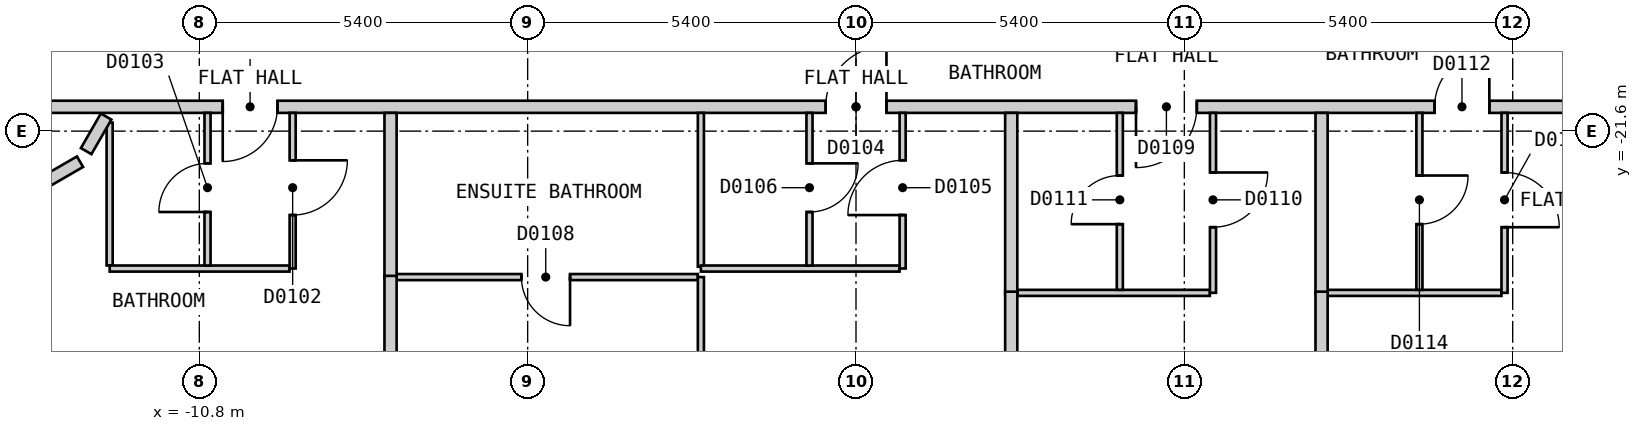
"""IFC4 building model, lengths in metres.
Left out: names, types, materials, properties, quantities, classifications, styles, units other than length and angle.
Written with IfcOpenShell. Run it as: python <this file> out.ifc"""

import sys

from ifc_helpers import new_model, si_unit, direction, frame, frame_2d, origin, place, context, subcontext, project, spatial, rectangle, extrude, element, fill, save


model = new_model("IFC4")
c1 = context("Model", 3, precision=1e-05, world=origin(), true_north=direction((0.0, 1.0)))
c2 = subcontext(c1, "Body", "Model", "MODEL_VIEW")
j1 = project(units=[si_unit("LENGTHUNIT", "METRE"), si_unit("PLANEANGLEUNIT", "RADIAN")], contexts=[c1])
p1 = place(None, origin())
s1 = spatial("IfcSite", under=j1, at=p1, CompositionType="ELEMENT")
p2 = place(p1, origin())
s2 = spatial("IfcBuilding", under=s1, at=p2, CompositionType="ELEMENT")
p3 = place(p2, frame((0.0, 0.0, 23.4)))
s3 = spatial("IfcBuildingStorey", under=s2, at=p3, CompositionType="ELEMENT", Elevation=23.4)
p4 = place(p3, frame((-15.4, -21.2, 0.0), z_axis=(0.0, 0.0, 1.0), x_axis=(1.0, 0.0, 0.0)))
e1 = element("IfcWall", 1, at=p4, inside=s3, PredefinedType="PARTITIONING", context=c2, shape_type="SweptSolid", body=[
    extrude(rectangle(XDim=30.799, YDim=0.2, at=frame_2d((15.399, 0.0))), origin(), (0.0, 0.0, 1.0), 2.7),
])
p5 = place(p4, frame((4.985, 0.0, 0.0)))
e2 = element("IfcOpeningElement", 2, at=p5, cuts=e1, PredefinedType="OPENING", context=c2, shape_type="SweptSolid", body=[
    extrude(rectangle(XDim=0.9, YDim=2.1, at=frame_2d((0.45, 1.05))), frame((0.0, 0.11, 0.0), z_axis=(0.0, -1.0, 0.0), x_axis=(1.0, 0.0, 0.0)), (0.0, 0.0, 1.0), 0.22),
])
p6 = place(p4, frame((14.901, 0.0, 0.0)))
e3 = element("IfcOpeningElement", 3, at=p6, cuts=e1, PredefinedType="OPENING", context=c2, shape_type="SweptSolid", body=[
    extrude(rectangle(XDim=1.0, YDim=2.1, at=frame_2d((0.5, 1.05))), frame((0.0, 0.11, 0.0), z_axis=(0.0, -1.0, 0.0), x_axis=(1.0, 0.0, 0.0)), (0.0, 0.0, 1.0), 0.22),
])
p7 = place(p4, frame((20.005, 0.0, 0.0)))
e4 = element("IfcOpeningElement", 4, at=p7, cuts=e1, PredefinedType="OPENING", context=c2, shape_type="SweptSolid", body=[
    extrude(rectangle(XDim=1.0, YDim=2.1, at=frame_2d((0.5, 1.05))), frame((0.0, 0.11, 0.0), z_axis=(0.0, -1.0, 0.0), x_axis=(1.0, 0.0, 0.0)), (0.0, 0.0, 1.0), 0.22),
])
p8 = place(p4, frame((24.916, 0.0, 0.0)))
e5 = element("IfcOpeningElement", 5, at=p8, cuts=e1, PredefinedType="OPENING", context=c2, shape_type="SweptSolid", body=[
    extrude(rectangle(XDim=0.9, YDim=2.1, at=frame_2d((0.45, 1.05))), frame((0.0, 0.11, 0.0), z_axis=(0.0, -1.0, 0.0), x_axis=(1.0, 0.0, 0.0)), (0.0, 0.0, 1.0), 0.22),
])
p9 = place(p3, frame((-12.275, -21.46, 0.0), z_axis=(0.0, 0.0, 1.0), x_axis=(0.0, -1.0, 0.0)))
e6 = element("IfcWall", 6, at=p9, inside=s3, PredefinedType="PARTITIONING", context=c2, shape_type="SweptSolid", body=[
    extrude(rectangle(XDim=2.349, YDim=0.1, at=frame_2d((1.175, 0.0))), origin(), (0.0, 0.0, 1.0), 2.7),
])
p10 = place(p3, frame((-2.551, -21.3, 0.0), z_axis=(0.0, 0.0, 1.0), x_axis=(0.0, -1.0, 0.0)))
e7 = element("IfcWall", 7, at=p10, inside=s3, PredefinedType="PARTITIONING", context=c2, shape_type="SweptSolid", body=[
    extrude(rectangle(XDim=2.53, YDim=0.1, at=frame_2d((1.265, 0.0))), origin(), (0.0, 0.0, 1.0), 2.7),
])
p11 = place(p3, frame((-12.274, -23.86, 0.0), z_axis=(0.0, 0.0, 1.0), x_axis=(1.0, 0.0, 0.0)))
e8 = element("IfcWall", 8, at=p11, inside=s3, PredefinedType="PARTITIONING", context=c2, shape_type="SweptSolid", body=[
    extrude(rectangle(XDim=2.958, YDim=0.1, at=frame_2d((1.479, 0.0))), origin(), (0.0, 0.0, 1.0), 2.7),
])
p12 = place(p3, frame((-2.551, -23.86, 0.0), z_axis=(0.0, 0.0, 1.0), x_axis=(1.0, 0.0, 0.0)))
e9 = element("IfcWall", 9, at=p12, inside=s3, PredefinedType="PARTITIONING", context=c2, shape_type="SweptSolid", body=[
    extrude(rectangle(XDim=3.267, YDim=0.1, at=frame_2d((1.634, 0.0))), origin(), (0.0, 0.0, 1.0), 2.7),
])
p13 = place(p3, frame((-7.555, -24.0, 0.0), z_axis=(0.0, 0.0, 1.0), x_axis=(1.0, 0.0, 0.0)))
e10 = element("IfcWall", 10, at=p13, inside=s3, PredefinedType="PARTITIONING", context=c2, shape_type="SweptSolid", body=[
    extrude(rectangle(XDim=4.954, YDim=0.1, at=frame_2d((2.477, 0.0))), origin(), (0.0, 0.0, 1.0), 2.7),
])
p14 = place(p13, frame((2.052, 0.0, 0.0)))
e11 = element("IfcOpeningElement", 11, at=p14, cuts=e10, PredefinedType="OPENING", context=c2, shape_type="SweptSolid", body=[
    extrude(rectangle(XDim=0.8, YDim=2.1, at=frame_2d((0.4, 1.05))), frame((0.0, 0.06, 0.0), z_axis=(0.0, -1.0, 0.0), x_axis=(1.0, 0.0, 0.0)), (0.0, 0.0, 1.0), 0.12),
])
p15 = place(p3, frame((2.653, -24.26, 0.0), z_axis=(0.0, 0.0, 1.0), x_axis=(1.0, 0.0, 0.0)))
e12 = element("IfcWall", 12, at=p15, inside=s3, PredefinedType="PARTITIONING", context=c2, shape_type="SweptSolid", body=[
    extrude(rectangle(XDim=3.167, YDim=0.1, at=frame_2d((1.583, 0.0))), origin(), (0.0, 0.0, 1.0), 2.7),
])
p16 = place(p3, frame((7.757, -24.26, 0.0), z_axis=(0.0, 0.0, 1.0), x_axis=(1.0, 0.0, 0.0)))
e13 = element("IfcWall", 13, at=p16, inside=s3, PredefinedType="PARTITIONING", context=c2, shape_type="SweptSolid", body=[
    extrude(rectangle(XDim=2.858, YDim=0.1, at=frame_2d((1.429, 0.0))), origin(), (0.0, 0.0, 1.0), 2.7),
])
p17 = place(p3, frame((4.339, -24.21, 0.0), z_axis=(0.0, 0.0, 1.0), x_axis=(0.0, 1.0, 0.0)))
e14 = element("IfcWall", 14, at=p17, inside=s3, PredefinedType="PARTITIONING", context=c2, shape_type="SweptSolid", body=[
    extrude(rectangle(XDim=2.91, YDim=0.1, at=frame_2d((1.455, 0.0))), origin(), (0.0, 0.0, 1.0), 2.7),
])
p18 = place(p17, frame((1.08, 0.0, 0.0)))
e15 = element("IfcOpeningElement", 15, at=p18, cuts=e14, PredefinedType="OPENING", context=c2, shape_type="SweptSolid", body=[
    extrude(rectangle(XDim=0.8, YDim=2.1, at=frame_2d((0.4, 1.05))), frame((0.0, 0.06, 0.0), z_axis=(0.0, -1.0, 0.0), x_axis=(1.0, 0.0, 0.0)), (0.0, 0.0, 1.0), 0.12),
])
p19 = place(p3, frame((5.871, -24.259, 0.0), z_axis=(0.0, 0.0, 1.0), x_axis=(0.0, 1.0, 0.0)))
e16 = element("IfcWall", 16, at=p19, inside=s3, PredefinedType="PARTITIONING", context=c2, shape_type="SweptSolid", body=[
    extrude(rectangle(XDim=2.959, YDim=0.1, at=frame_2d((1.479, 0.0))), origin(), (0.0, 0.0, 1.0), 2.7),
])
p20 = place(p19, frame((1.079, 0.0, 0.0)))
e17 = element("IfcOpeningElement", 17, at=p20, cuts=e16, PredefinedType="OPENING", context=c2, shape_type="SweptSolid", body=[
    extrude(rectangle(XDim=0.9, YDim=2.1, at=frame_2d((0.45, 1.05))), frame((0.0, 0.06, 0.0), z_axis=(0.0, -1.0, 0.0), x_axis=(1.0, 0.0, 0.0)), (0.0, 0.0, 1.0), 0.12),
])
p21 = place(p3, frame((0.767, -23.859, 0.0), z_axis=(0.0, 0.0, 1.0), x_axis=(0.0, 1.0, 0.0)))
e18 = element("IfcWall", 18, at=p21, inside=s3, PredefinedType="PARTITIONING", context=c2, shape_type="SweptSolid", body=[
    extrude(rectangle(XDim=2.559, YDim=0.1, at=frame_2d((1.279, 0.0))), origin(), (0.0, 0.0, 1.0), 2.7),
])
p22 = place(p21, frame((0.879, 0.0, 0.0)))
e19 = element("IfcOpeningElement", 19, at=p22, cuts=e18, PredefinedType="OPENING", context=c2, shape_type="SweptSolid", body=[
    extrude(rectangle(XDim=0.9, YDim=2.1, at=frame_2d((0.45, 1.05))), frame((0.0, 0.06, 0.0), z_axis=(0.0, -1.0, 0.0), x_axis=(1.0, 0.0, 0.0)), (0.0, 0.0, 1.0), 0.12),
])
p23 = place(p3, frame((9.266, -24.21, 0.0), z_axis=(0.0, 0.0, 1.0), x_axis=(0.0, 1.0, 0.0)))
e20 = element("IfcWall", 20, at=p23, inside=s3, PredefinedType="PARTITIONING", context=c2, shape_type="SweptSolid", body=[
    extrude(rectangle(XDim=2.91, YDim=0.1, at=frame_2d((1.455, 0.0))), origin(), (0.0, 0.0, 1.0), 2.7),
])
p24 = place(p23, frame((1.08, 0.0, 0.0)))
e21 = element("IfcOpeningElement", 21, at=p24, cuts=e20, PredefinedType="OPENING", context=c2, shape_type="SweptSolid", body=[
    extrude(rectangle(XDim=0.8, YDim=2.1, at=frame_2d((0.4, 1.05))), frame((0.0, 0.06, 0.0), z_axis=(0.0, -1.0, 0.0), x_axis=(1.0, 0.0, 0.0)), (0.0, 0.0, 1.0), 0.12),
])
p25 = place(p3, frame((10.666, -24.259, 0.0), z_axis=(0.0, 0.0, 1.0), x_axis=(0.0, 1.0, 0.0)))
e22 = element("IfcWall", 22, at=p25, inside=s3, PredefinedType="PARTITIONING", context=c2, shape_type="SweptSolid", body=[
    extrude(rectangle(XDim=2.959, YDim=0.1, at=frame_2d((1.479, 0.0))), origin(), (0.0, 0.0, 1.0), 2.7),
])
p26 = place(p25, frame((1.079, 0.0, 0.0)))
e23 = element("IfcOpeningElement", 23, at=p26, cuts=e22, PredefinedType="OPENING", context=c2, shape_type="SweptSolid", body=[
    extrude(rectangle(XDim=0.9, YDim=2.1, at=frame_2d((0.45, 1.05))), frame((0.0, 0.06, 0.0), z_axis=(0.0, -1.0, 0.0), x_axis=(1.0, 0.0, 0.0)), (0.0, 0.0, 1.0), 0.12),
])
p27 = place(p3, frame((-0.765, -23.81, 0.0), z_axis=(0.0, 0.0, 1.0), x_axis=(0.0, 1.0, 0.0)))
e24 = element("IfcWall", 24, at=p27, inside=s3, PredefinedType="PARTITIONING", context=c2, shape_type="SweptSolid", body=[
    extrude(rectangle(XDim=2.51, YDim=0.1, at=frame_2d((1.255, 0.0))), origin(), (0.0, 0.0, 1.0), 2.7),
])
p28 = place(p27, frame((0.88, 0.0, 0.0)))
e25 = element("IfcOpeningElement", 25, at=p28, cuts=e24, PredefinedType="OPENING", context=c2, shape_type="SweptSolid", body=[
    extrude(rectangle(XDim=0.8, YDim=2.1, at=frame_2d((0.4, 1.05))), frame((0.0, 0.06, 0.0), z_axis=(0.0, -1.0, 0.0), x_axis=(1.0, 0.0, 0.0)), (0.0, 0.0, 1.0), 0.12),
])
p29 = place(p3, frame((-9.265, -23.859, 0.0), z_axis=(0.0, 0.0, 1.0), x_axis=(0.0, 1.0, 0.0)))
e26 = element("IfcWall", 26, at=p29, inside=s3, PredefinedType="PARTITIONING", context=c2, shape_type="SweptSolid", body=[
    extrude(rectangle(XDim=2.559, YDim=0.1, at=frame_2d((1.279, 0.0))), origin(), (0.0, 0.0, 1.0), 2.7),
])
p30 = place(p29, frame((0.879, 0.0, 0.0)))
e27 = element("IfcOpeningElement", 27, at=p30, cuts=e26, PredefinedType="OPENING", context=c2, shape_type="SweptSolid", body=[
    extrude(rectangle(XDim=0.9, YDim=2.1, at=frame_2d((0.45, 1.05))), frame((0.0, 0.06, 0.0), z_axis=(0.0, -1.0, 0.0), x_axis=(1.0, 0.0, 0.0)), (0.0, 0.0, 1.0), 0.12),
])
p31 = place(p3, frame((-10.665, -23.81, 0.0), z_axis=(0.0, 0.0, 1.0), x_axis=(0.0, 1.0, 0.0)))
e28 = element("IfcWall", 28, at=p31, inside=s3, PredefinedType="PARTITIONING", context=c2, shape_type="SweptSolid", body=[
    extrude(rectangle(XDim=2.51, YDim=0.1, at=frame_2d((1.255, 0.0))), origin(), (0.0, 0.0, 1.0), 2.7),
])
p32 = place(p31, frame((0.88, 0.0, 0.0)))
e29 = element("IfcOpeningElement", 29, at=p32, cuts=e28, PredefinedType="OPENING", context=c2, shape_type="SweptSolid", body=[
    extrude(rectangle(XDim=0.8, YDim=2.1, at=frame_2d((0.4, 1.05))), frame((0.0, 0.06, 0.0), z_axis=(0.0, -1.0, 0.0), x_axis=(1.0, 0.0, 0.0)), (0.0, 0.0, 1.0), 0.12),
])
p33 = place(p3, frame((-2.551, -28.1, 0.0), z_axis=(0.0, 0.0, 1.0), x_axis=(0.0, 1.0, 0.0)))
e30 = element("IfcWall", 30, at=p33, inside=s3, PredefinedType="PARTITIONING", context=c2, shape_type="SweptSolid", body=[
    extrude(rectangle(XDim=4.1, YDim=0.1, at=frame_2d((2.05, 0.0))), origin(), (0.0, 0.0, 1.0), 2.7),
])
p34 = place(p33, frame((1.7, 0.0, 0.0)))
e31 = element("IfcOpeningElement", 31, at=p34, cuts=e30, PredefinedType="OPENING", context=c2, shape_type="SweptSolid", body=[
    extrude(rectangle(XDim=0.9, YDim=2.1, at=frame_2d((0.45, 1.05))), frame((0.0, 0.06, 0.0), z_axis=(0.0, -1.0, 0.0), x_axis=(1.0, 0.0, 0.0)), (0.0, 0.0, 1.0), 0.12),
])
p35 = place(p3, frame((-7.655, -21.3, 0.0), z_axis=(0.0, 0.0, 1.0), x_axis=(0.0, -1.0, 0.0)))
e32 = element("IfcWall", 32, at=p35, inside=s3, PredefinedType="PARTITIONING", context=c2, shape_type="SweptSolid", body=[
    extrude(rectangle(XDim=2.72, YDim=0.2, at=frame_2d((1.36, 0.0))), origin(), (0.0, 0.0, 1.0), 2.7),
])
for number, where, z_axis, x_axis in (
    (33, (7.657, -21.3, 0.0), (0.0, 0.0, 1.0), (0.0, -1.0, 0.0)),
    (34, (2.553, -21.3, 0.0), (0.0, 0.0, 1.0), (0.0, -1.0, 0.0)),
):
    element("IfcWall", number, at=place(p3, frame(where, z_axis=z_axis, x_axis=x_axis)), inside=s3, PredefinedType="PARTITIONING", context=c2, shape_type="SweptSolid", body=[
        extrude(rectangle(XDim=2.98, YDim=0.2, at=frame_2d((1.49, 0.0))), origin(), (0.0, 0.0, 1.0), 2.7),
    ])
p36 = place(p3, frame((-12.661, -21.929, 0.0), z_axis=(0.0, 0.0, 1.0), x_axis=(0.499379051742, 0.866383611734, 0.0)))
e35 = element("IfcWall", 35, at=p36, inside=s3, PredefinedType="PARTITIONING", context=c2, shape_type="SweptSolid", body=[
    extrude(rectangle(XDim=0.656, YDim=0.2, at=frame_2d((0.328, 0.0))), origin(), (0.0, 0.0, 1.0), 2.7),
])
for number, where, z_axis, x_axis in (
    (36, (7.657, -28.1, 0.0), (0.0, 0.0, 1.0), (0.0, 1.0, 0.0)),
    (37, (2.553, -28.1, 0.0), (0.0, 0.0, 1.0), (0.0, 1.0, 0.0)),
):
    element("IfcWall", number, at=place(p3, frame(where, z_axis=z_axis, x_axis=x_axis)), inside=s3, PredefinedType="PARTITIONING", context=c2, shape_type="SweptSolid", body=[
        extrude(rectangle(XDim=3.86, YDim=0.2, at=frame_2d((1.93, 0.0))), origin(), (0.0, 0.0, 1.0), 2.7),
    ])
p37 = place(p3, frame((-7.655, -28.1, 0.0), z_axis=(0.0, 0.0, 1.0), x_axis=(0.0, 1.0, 0.0)))
e38 = element("IfcWall", 38, at=p37, inside=s3, PredefinedType="PARTITIONING", context=c2, shape_type="SweptSolid", body=[
    extrude(rectangle(XDim=4.12, YDim=0.2, at=frame_2d((2.06, 0.0))), origin(), (0.0, 0.0, 1.0), 2.7),
])
p38 = place(p3, frame((-17.954, -25.101, 0.0), z_axis=(0.0, 0.0, 1.0), x_axis=(0.865999098103, 0.500045560009, 0.0)))
e39 = element("IfcWall", 39, at=p38, inside=s3, PredefinedType="PARTITIONING", context=c2, shape_type="SweptSolid", body=[
    extrude(rectangle(XDim=5.996, YDim=0.2, at=frame_2d((2.998, 0.0))), origin(), (0.0, 0.0, 1.0), 2.7),
])
p39 = place(p5, origin())
e40 = element("IfcDoor", 40, at=p39, inside=s3, OperationType="SINGLE_SWING_LEFT", PredefinedType="DOOR", context=c2, shape_type="SweptSolid", body=[
    extrude(rectangle(XDim=0.9, YDim=2.1, at=frame_2d((0.45, 1.05))), frame((0.0, 0.025, 0.0), z_axis=(0.0, -1.0, 0.0), x_axis=(1.0, 0.0, 0.0)), (0.0, 0.0, 1.0), 0.05),
])
fill(e2, e40)
p40 = place(p30, origin())
e41 = element("IfcDoor", 41, at=p40, inside=s3, OperationType="SINGLE_SWING_RIGHT", PredefinedType="DOOR", context=c2, shape_type="SweptSolid", body=[
    extrude(rectangle(XDim=0.9, YDim=2.1, at=frame_2d((0.45, 1.05))), frame((0.0, 0.025, 0.0), z_axis=(0.0, -1.0, 0.0), x_axis=(1.0, 0.0, 0.0)), (0.0, 0.0, 1.0), 0.05),
])
fill(e27, e41)
p41 = place(p32, origin())
e42 = element("IfcDoor", 42, at=p41, inside=s3, OperationType="SINGLE_SWING_LEFT", PredefinedType="DOOR", context=c2, shape_type="SweptSolid", body=[
    extrude(rectangle(XDim=0.8, YDim=2.1, at=frame_2d((0.4, 1.05))), frame((0.0, 0.025, 0.0), z_axis=(0.0, -1.0, 0.0), x_axis=(1.0, 0.0, 0.0)), (0.0, 0.0, 1.0), 0.05),
])
fill(e29, e42)
p42 = place(p6, origin())
e43 = element("IfcDoor", 43, at=p42, inside=s3, OperationType="SINGLE_SWING_RIGHT", PredefinedType="DOOR", context=c2, shape_type="SweptSolid", body=[
    extrude(rectangle(XDim=1.0, YDim=2.1, at=frame_2d((0.5, 1.05))), frame((0.0, 0.025, 0.0), z_axis=(0.0, -1.0, 0.0), x_axis=(1.0, 0.0, 0.0)), (0.0, 0.0, 1.0), 0.05),
])
fill(e3, e43)
p43 = place(p22, origin())
e44 = element("IfcDoor", 44, at=p43, inside=s3, OperationType="SINGLE_SWING_LEFT", PredefinedType="DOOR", context=c2, shape_type="SweptSolid", body=[
    extrude(rectangle(XDim=0.9, YDim=2.1, at=frame_2d((0.45, 1.05))), frame((0.0, 0.025, 0.0), z_axis=(0.0, -1.0, 0.0), x_axis=(1.0, 0.0, 0.0)), (0.0, 0.0, 1.0), 0.05),
])
fill(e19, e44)
p44 = place(p28, origin())
e45 = element("IfcDoor", 45, at=p44, inside=s3, OperationType="SINGLE_SWING_RIGHT", PredefinedType="DOOR", context=c2, shape_type="SweptSolid", body=[
    extrude(rectangle(XDim=0.8, YDim=2.1, at=frame_2d((0.4, 1.05))), frame((0.0, 0.025, 0.0), z_axis=(0.0, -1.0, 0.0), x_axis=(1.0, 0.0, 0.0)), (0.0, 0.0, 1.0), 0.05),
])
fill(e25, e45)
p45 = place(p14, origin())
e46 = element("IfcDoor", 46, at=p45, inside=s3, OperationType="SINGLE_SWING_RIGHT", PredefinedType="DOOR", context=c2, shape_type="SweptSolid", body=[
    extrude(rectangle(XDim=0.8, YDim=2.1, at=frame_2d((0.4, 1.05))), frame((0.0, 0.025, 0.0), z_axis=(0.0, -1.0, 0.0), x_axis=(1.0, 0.0, 0.0)), (0.0, 0.0, 1.0), 0.05),
])
fill(e11, e46)
p46 = place(p7, origin())
e47 = element("IfcDoor", 47, at=p46, inside=s3, OperationType="SINGLE_SWING_LEFT", PredefinedType="DOOR", context=c2, shape_type="SweptSolid", body=[
    extrude(rectangle(XDim=1.0, YDim=2.1, at=frame_2d((0.5, 1.05))), frame((0.0, 0.025, 0.0), z_axis=(0.0, -1.0, 0.0), x_axis=(1.0, 0.0, 0.0)), (0.0, 0.0, 1.0), 0.05),
])
fill(e4, e47)
p47 = place(p20, origin())
e48 = element("IfcDoor", 48, at=p47, inside=s3, OperationType="SINGLE_SWING_RIGHT", PredefinedType="DOOR", context=c2, shape_type="SweptSolid", body=[
    extrude(rectangle(XDim=0.9, YDim=2.1, at=frame_2d((0.45, 1.05))), frame((0.0, 0.025, 0.0), z_axis=(0.0, -1.0, 0.0), x_axis=(1.0, 0.0, 0.0)), (0.0, 0.0, 1.0), 0.05),
])
fill(e17, e48)
p48 = place(p18, origin())
e49 = element("IfcDoor", 49, at=p48, inside=s3, OperationType="SINGLE_SWING_LEFT", PredefinedType="DOOR", context=c2, shape_type="SweptSolid", body=[
    extrude(rectangle(XDim=0.8, YDim=2.1, at=frame_2d((0.4, 1.05))), frame((0.0, 0.025, 0.0), z_axis=(0.0, -1.0, 0.0), x_axis=(1.0, 0.0, 0.0)), (0.0, 0.0, 1.0), 0.05),
])
fill(e15, e49)
p49 = place(p8, origin())
e50 = element("IfcDoor", 50, at=p49, inside=s3, OperationType="SINGLE_SWING_RIGHT", PredefinedType="DOOR", context=c2, shape_type="SweptSolid", body=[
    extrude(rectangle(XDim=0.9, YDim=2.1, at=frame_2d((0.45, 1.05))), frame((0.0, 0.025, 0.0), z_axis=(0.0, -1.0, 0.0), x_axis=(1.0, 0.0, 0.0)), (0.0, 0.0, 1.0), 0.05),
])
fill(e5, e50)
p50 = place(p26, origin())
e51 = element("IfcDoor", 51, at=p50, inside=s3, OperationType="SINGLE_SWING_LEFT", PredefinedType="DOOR", context=c2, shape_type="SweptSolid", body=[
    extrude(rectangle(XDim=0.9, YDim=2.1, at=frame_2d((0.45, 1.05))), frame((0.0, 0.025, 0.0), z_axis=(0.0, -1.0, 0.0), x_axis=(1.0, 0.0, 0.0)), (0.0, 0.0, 1.0), 0.05),
])
fill(e23, e51)
p51 = place(p24, origin())
e52 = element("IfcDoor", 52, at=p51, inside=s3, OperationType="SINGLE_SWING_RIGHT", PredefinedType="DOOR", context=c2, shape_type="SweptSolid", body=[
    extrude(rectangle(XDim=0.8, YDim=2.1, at=frame_2d((0.4, 1.05))), frame((0.0, 0.025, 0.0), z_axis=(0.0, -1.0, 0.0), x_axis=(1.0, 0.0, 0.0)), (0.0, 0.0, 1.0), 0.05),
])
fill(e21, e52)
save(model, sys.argv[1])
